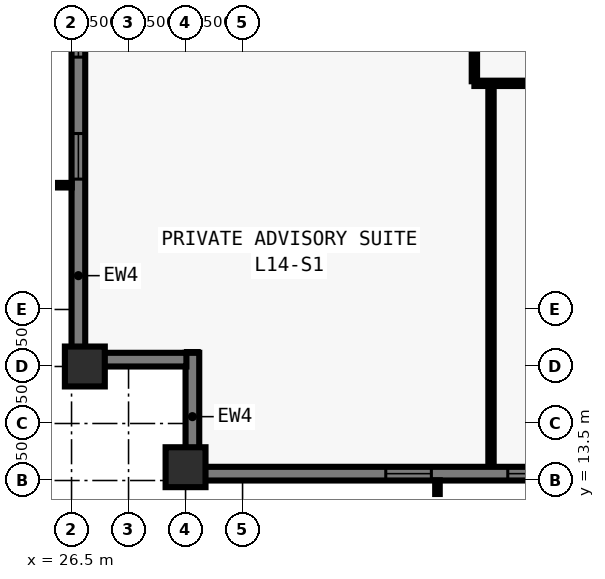
"""IFC4 building model, lengths in metres.
Left out: names, types, materials, properties, quantities, classifications, styles, units other than length and angle.
Written with IfcOpenShell. Run it as: python <this file> out.ifc"""

import sys

from ifc_helpers import new_model, si_unit, direction, frame, frame_2d, origin, origin_2d, place, context, subcontext, project, spatial, rectangle, extrude, element, fill, save


model = new_model("IFC4")
c1 = context("Model", 3, precision=1e-05, world=origin(), true_north=direction((0.0, 1.0)))
c2 = subcontext(c1, "Body", "Model", "MODEL_VIEW")
j1 = project(units=[si_unit("LENGTHUNIT", "METRE"), si_unit("PLANEANGLEUNIT", "RADIAN")], contexts=[c1])
p1 = place(None, origin())
s1 = spatial("IfcSite", under=j1, at=p1, CompositionType="ELEMENT")
p2 = place(p1, origin())
s2 = spatial("IfcBuilding", under=s1, at=p2, CompositionType="ELEMENT")
p3 = place(p2, frame((0.0, 0.0, 55.0)))
s3 = spatial("IfcBuildingStorey", under=s2, at=p3, CompositionType="ELEMENT", Elevation=55.0)
for number, where, z_axis, x_axis in (
    (1, (29.5, 13.85, 0.0), (0.0, 0.0, 1.0), (1.0, 0.0, 0.0)),
    (2, (26.85, 16.5, 0.0), (0.0, 0.0, 1.0), (0.0, 1.0, 0.0)),
):
    element("IfcColumn", number, at=place(p3, frame(where, z_axis=z_axis, x_axis=x_axis)), inside=s3, PredefinedType="COLUMN", context=c2, shape_type="SweptSolid", body=[
        extrude(rectangle(XDim=1.05, YDim=1.05, at=origin_2d()), origin(), (0.0, 0.0, 1.0), 3.5),
    ])
p4 = place(p3, frame((74.5, 13.68, 0.0), z_axis=(0.0, 0.0, 1.0), x_axis=(-1.0, 0.0, 0.0)))
e3 = element("IfcWall", 3, at=p4, inside=s3, PredefinedType="SOLIDWALL", context=c2, shape_type="SweptSolid", body=[
    extrude(rectangle(XDim=44.662, YDim=0.36, at=frame_2d((22.331, 0.0))), origin(), (0.0, 0.0, 1.0), 3.28),
])
p5 = place(p4, frame((4.93, 0.0, 0.8)))
e4 = element("IfcOpeningElement", 4, at=p5, cuts=e3, PredefinedType="OPENING", context=c2, shape_type="SweptSolid", body=[
    extrude(rectangle(XDim=1.2, YDim=1.544, at=frame_2d((0.6, 0.772))), frame((0.0, 0.19, 0.0), z_axis=(0.0, -1.0, 0.0), x_axis=(1.0, 0.0, 0.0)), (0.0, 0.0, 1.0), 0.38),
])
p6 = place(p4, frame((8.59, 0.0, 0.8)))
e5 = element("IfcOpeningElement", 5, at=p6, cuts=e3, PredefinedType="OPENING", context=c2, shape_type="SweptSolid", body=[
    extrude(rectangle(XDim=1.5, YDim=1.544, at=frame_2d((0.75, 0.772))), frame((0.0, 0.19, 0.0), z_axis=(0.0, -1.0, 0.0), x_axis=(1.0, 0.0, 0.0)), (0.0, 0.0, 1.0), 0.38),
])
p7 = place(p4, frame((11.65, 0.0, 0.8)))
e6 = element("IfcOpeningElement", 6, at=p7, cuts=e3, PredefinedType="OPENING", context=c2, shape_type="SweptSolid", body=[
    extrude(rectangle(XDim=1.2, YDim=1.544, at=frame_2d((0.6, 0.772))), frame((0.0, 0.19, 0.0), z_axis=(0.0, -1.0, 0.0), x_axis=(1.0, 0.0, 0.0)), (0.0, 0.0, 1.0), 0.38),
])
p8 = place(p4, frame((14.861, 0.0, 0.8)))
e7 = element("IfcOpeningElement", 7, at=p8, cuts=e3, PredefinedType="OPENING", context=c2, shape_type="SweptSolid", body=[
    extrude(rectangle(XDim=1.5, YDim=1.544, at=frame_2d((0.75, 0.772))), frame((0.0, 0.19, 0.0), z_axis=(0.0, -1.0, 0.0), x_axis=(1.0, 0.0, 0.0)), (0.0, 0.0, 1.0), 0.38),
])
p9 = place(p4, frame((18.821, 0.0, 0.8)))
e8 = element("IfcOpeningElement", 8, at=p9, cuts=e3, PredefinedType="OPENING", context=c2, shape_type="SweptSolid", body=[
    extrude(rectangle(XDim=1.2, YDim=1.544, at=frame_2d((0.6, 0.772))), frame((0.0, 0.19, 0.0), z_axis=(0.0, -1.0, 0.0), x_axis=(1.0, 0.0, 0.0)), (0.0, 0.0, 1.0), 0.38),
])
p10 = place(p4, frame((21.581, 0.0, 0.8)))
e9 = element("IfcOpeningElement", 9, at=p10, cuts=e3, PredefinedType="OPENING", context=c2, shape_type="SweptSolid", body=[
    extrude(rectangle(XDim=1.5, YDim=1.544, at=frame_2d((0.75, 0.772))), frame((0.0, 0.19, 0.0), z_axis=(0.0, -1.0, 0.0), x_axis=(1.0, 0.0, 0.0)), (0.0, 0.0, 1.0), 0.38),
])
p11 = place(p4, frame((25.091, 0.0, 0.8)))
e10 = element("IfcOpeningElement", 10, at=p11, cuts=e3, PredefinedType="OPENING", context=c2, shape_type="SweptSolid", body=[
    extrude(rectangle(XDim=1.2, YDim=1.544, at=frame_2d((0.6, 0.772))), frame((0.0, 0.19, 0.0), z_axis=(0.0, -1.0, 0.0), x_axis=(1.0, 0.0, 0.0)), (0.0, 0.0, 1.0), 0.38),
])
p12 = place(p4, frame((28.302, 0.0, 0.8)))
e11 = element("IfcOpeningElement", 11, at=p12, cuts=e3, PredefinedType="OPENING", context=c2, shape_type="SweptSolid", body=[
    extrude(rectangle(XDim=1.5, YDim=1.544, at=frame_2d((0.75, 0.772))), frame((0.0, 0.19, 0.0), z_axis=(0.0, -1.0, 0.0), x_axis=(1.0, 0.0, 0.0)), (0.0, 0.0, 1.0), 0.38),
])
p13 = place(p4, frame((31.812, 0.0, 0.8)))
e12 = element("IfcOpeningElement", 12, at=p13, cuts=e3, PredefinedType="OPENING", context=c2, shape_type="SweptSolid", body=[
    extrude(rectangle(XDim=1.2, YDim=1.544, at=frame_2d((0.6, 0.772))), frame((0.0, 0.19, 0.0), z_axis=(0.0, -1.0, 0.0), x_axis=(1.0, 0.0, 0.0)), (0.0, 0.0, 1.0), 0.38),
])
p14 = place(p4, frame((35.022, 0.0, 0.8)))
e13 = element("IfcOpeningElement", 13, at=p14, cuts=e3, PredefinedType="OPENING", context=c2, shape_type="SweptSolid", body=[
    extrude(rectangle(XDim=1.5, YDim=1.544, at=frame_2d((0.75, 0.772))), frame((0.0, 0.19, 0.0), z_axis=(0.0, -1.0, 0.0), x_axis=(1.0, 0.0, 0.0)), (0.0, 0.0, 1.0), 0.38),
])
p15 = place(p4, frame((38.532, 0.0, 0.8)))
e14 = element("IfcOpeningElement", 14, at=p15, cuts=e3, PredefinedType="OPENING", context=c2, shape_type="SweptSolid", body=[
    extrude(rectangle(XDim=1.2, YDim=1.544, at=frame_2d((0.6, 0.772))), frame((0.0, 0.19, 0.0), z_axis=(0.0, -1.0, 0.0), x_axis=(1.0, 0.0, 0.0)), (0.0, 0.0, 1.0), 0.38),
])
p16 = place(p3, frame((29.68, 13.5, 0.0), z_axis=(0.0, 0.0, 1.0), x_axis=(0.0, 1.0, 0.0)))
e15 = element("IfcWall", 15, at=p16, inside=s3, PredefinedType="SOLIDWALL", context=c2, shape_type="SweptSolid", body=[
    extrude(rectangle(XDim=3.36, YDim=0.36, at=frame_2d((1.68, 0.0))), origin(), (0.0, 0.0, 1.0), 3.28),
])
p17 = place(p3, frame((29.522, 16.68, 0.0), z_axis=(0.0, 0.0, 1.0), x_axis=(-1.0, 0.0, 0.0)))
e16 = element("IfcWall", 16, at=p17, inside=s3, PredefinedType="SOLIDWALL", context=c2, shape_type="SweptSolid", body=[
    extrude(rectangle(XDim=2.684, YDim=0.36, at=frame_2d((1.342, 0.0))), origin(), (0.0, 0.0, 1.0), 3.28),
])
p18 = place(p3, frame((26.68, 16.5, 0.0), z_axis=(0.0, 0.0, 1.0), x_axis=(0.0, 1.0, 0.0)))
e17 = element("IfcWall", 17, at=p18, inside=s3, PredefinedType="SOLIDWALL", context=c2, shape_type="SweptSolid", body=[
    extrude(rectangle(XDim=44.662, YDim=0.36, at=frame_2d((22.331, 0.0))), origin(), (0.0, 0.0, 1.0), 3.28),
])
p19 = place(p18, frame((4.93, 0.0, 0.8)))
e18 = element("IfcOpeningElement", 18, at=p19, cuts=e17, PredefinedType="OPENING", context=c2, shape_type="SweptSolid", body=[
    extrude(rectangle(XDim=1.2, YDim=1.544, at=frame_2d((0.6, 0.772))), frame((0.0, 0.19, 0.0), z_axis=(0.0, -1.0, 0.0), x_axis=(1.0, 0.0, 0.0)), (0.0, 0.0, 1.0), 0.38),
])
p20 = place(p18, frame((8.14, 0.0, 0.8)))
e19 = element("IfcOpeningElement", 19, at=p20, cuts=e17, PredefinedType="OPENING", context=c2, shape_type="SweptSolid", body=[
    extrude(rectangle(XDim=1.5, YDim=1.544, at=frame_2d((0.75, 0.772))), frame((0.0, 0.19, 0.0), z_axis=(0.0, -1.0, 0.0), x_axis=(1.0, 0.0, 0.0)), (0.0, 0.0, 1.0), 0.38),
])
p21 = place(p18, frame((11.65, 0.0, 0.8)))
e20 = element("IfcOpeningElement", 20, at=p21, cuts=e17, PredefinedType="OPENING", context=c2, shape_type="SweptSolid", body=[
    extrude(rectangle(XDim=1.2, YDim=1.544, at=frame_2d((0.6, 0.772))), frame((0.0, 0.19, 0.0), z_axis=(0.0, -1.0, 0.0), x_axis=(1.0, 0.0, 0.0)), (0.0, 0.0, 1.0), 0.38),
])
p22 = place(p18, frame((14.861, 0.0, 0.8)))
e21 = element("IfcOpeningElement", 21, at=p22, cuts=e17, PredefinedType="OPENING", context=c2, shape_type="SweptSolid", body=[
    extrude(rectangle(XDim=1.5, YDim=1.544, at=frame_2d((0.75, 0.772))), frame((0.0, 0.19, 0.0), z_axis=(0.0, -1.0, 0.0), x_axis=(1.0, 0.0, 0.0)), (0.0, 0.0, 1.0), 0.38),
])
p23 = place(p18, frame((19.621, 0.0, 0.8)))
e22 = element("IfcOpeningElement", 22, at=p23, cuts=e17, PredefinedType="OPENING", context=c2, shape_type="SweptSolid", body=[
    extrude(rectangle(XDim=1.2, YDim=1.544, at=frame_2d((0.6, 0.772))), frame((0.0, 0.19, 0.0), z_axis=(0.0, -1.0, 0.0), x_axis=(1.0, 0.0, 0.0)), (0.0, 0.0, 1.0), 0.38),
])
p24 = place(p18, frame((21.581, 0.0, 0.8)))
e23 = element("IfcOpeningElement", 23, at=p24, cuts=e17, PredefinedType="OPENING", context=c2, shape_type="SweptSolid", body=[
    extrude(rectangle(XDim=1.5, YDim=1.544, at=frame_2d((0.75, 0.772))), frame((0.0, 0.19, 0.0), z_axis=(0.0, -1.0, 0.0), x_axis=(1.0, 0.0, 0.0)), (0.0, 0.0, 1.0), 0.38),
])
p25 = place(p18, frame((24.241, 0.0, 0.8)))
e24 = element("IfcOpeningElement", 24, at=p25, cuts=e17, PredefinedType="OPENING", context=c2, shape_type="SweptSolid", body=[
    extrude(rectangle(XDim=1.2, YDim=1.544, at=frame_2d((0.6, 0.772))), frame((0.0, 0.19, 0.0), z_axis=(0.0, -1.0, 0.0), x_axis=(1.0, 0.0, 0.0)), (0.0, 0.0, 1.0), 0.38),
])
p26 = place(p18, frame((28.302, 0.0, 0.8)))
e25 = element("IfcOpeningElement", 25, at=p26, cuts=e17, PredefinedType="OPENING", context=c2, shape_type="SweptSolid", body=[
    extrude(rectangle(XDim=1.5, YDim=1.544, at=frame_2d((0.75, 0.772))), frame((0.0, 0.19, 0.0), z_axis=(0.0, -1.0, 0.0), x_axis=(1.0, 0.0, 0.0)), (0.0, 0.0, 1.0), 0.38),
])
p27 = place(p18, frame((31.812, 0.0, 0.8)))
e26 = element("IfcOpeningElement", 26, at=p27, cuts=e17, PredefinedType="OPENING", context=c2, shape_type="SweptSolid", body=[
    extrude(rectangle(XDim=1.2, YDim=1.544, at=frame_2d((0.6, 0.772))), frame((0.0, 0.19, 0.0), z_axis=(0.0, -1.0, 0.0), x_axis=(1.0, 0.0, 0.0)), (0.0, 0.0, 1.0), 0.38),
])
p28 = place(p18, frame((35.022, 0.0, 0.8)))
e27 = element("IfcOpeningElement", 27, at=p28, cuts=e17, PredefinedType="OPENING", context=c2, shape_type="SweptSolid", body=[
    extrude(rectangle(XDim=1.5, YDim=1.544, at=frame_2d((0.75, 0.772))), frame((0.0, 0.19, 0.0), z_axis=(0.0, -1.0, 0.0), x_axis=(1.0, 0.0, 0.0)), (0.0, 0.0, 1.0), 0.38),
])
p29 = place(p18, frame((38.532, 0.0, 0.8)))
e28 = element("IfcOpeningElement", 28, at=p29, cuts=e17, PredefinedType="OPENING", context=c2, shape_type="SweptSolid", body=[
    extrude(rectangle(XDim=1.2, YDim=1.544, at=frame_2d((0.6, 0.772))), frame((0.0, 0.19, 0.0), z_axis=(0.0, -1.0, 0.0), x_axis=(1.0, 0.0, 0.0)), (0.0, 0.0, 1.0), 0.38),
])
p30 = place(p3, frame((37.1, 23.95, 0.0), z_axis=(0.0, 0.0, 1.0), x_axis=(1.0, 0.0, 0.0)))
e29 = element("IfcWall", 29, at=p30, inside=s3, PredefinedType="PARTITIONING", context=c2, shape_type="SweptSolid", body=[
    extrude(rectangle(XDim=29.8, YDim=0.14, at=frame_2d((14.9, 0.0))), origin(), (0.0, 0.0, 1.0), 3.28),
])
p31 = place(p30, frame((4.191, 0.0, 0.0)))
e30 = element("IfcOpeningElement", 30, at=p31, cuts=e29, PredefinedType="OPENING", context=c2, shape_type="SweptSolid", body=[
    extrude(rectangle(XDim=0.96, YDim=2.12, at=frame_2d((0.48, 1.06))), frame((0.0, 0.08, 0.0), z_axis=(0.0, -1.0, 0.0), x_axis=(1.0, 0.0, 0.0)), (0.0, 0.0, 1.0), 0.16),
])
p32 = place(p30, frame((5.358, 0.0, 0.0)))
e31 = element("IfcOpeningElement", 31, at=p32, cuts=e29, PredefinedType="OPENING", context=c2, shape_type="SweptSolid", body=[
    extrude(rectangle(XDim=0.96, YDim=2.12, at=frame_2d((0.48, 1.06))), frame((0.0, 0.08, 0.0), z_axis=(0.0, -1.0, 0.0), x_axis=(1.0, 0.0, 0.0)), (0.0, 0.0, 1.0), 0.16),
])
p33 = place(p30, frame((14.51, 0.0, 0.0)))
e32 = element("IfcOpeningElement", 32, at=p33, cuts=e29, PredefinedType="OPENING", context=c2, shape_type="SweptSolid", body=[
    extrude(rectangle(XDim=0.96, YDim=2.12, at=frame_2d((0.48, 1.06))), frame((0.0, 0.08, 0.0), z_axis=(0.0, -1.0, 0.0), x_axis=(1.0, 0.0, 0.0)), (0.0, 0.0, 1.0), 0.16),
])
p34 = place(p30, frame((24.542, 0.0, 0.0)))
e33 = element("IfcOpeningElement", 33, at=p34, cuts=e29, PredefinedType="OPENING", context=c2, shape_type="SweptSolid", body=[
    extrude(rectangle(XDim=0.96, YDim=2.12, at=frame_2d((0.48, 1.06))), frame((0.0, 0.08, 0.0), z_axis=(0.0, -1.0, 0.0), x_axis=(1.0, 0.0, 0.0)), (0.0, 0.0, 1.0), 0.16),
])
p35 = place(p30, frame((28.26, 0.0, 0.0)))
e34 = element("IfcOpeningElement", 34, at=p35, cuts=e29, PredefinedType="OPENING", context=c2, shape_type="SweptSolid", body=[
    extrude(rectangle(XDim=0.96, YDim=2.12, at=frame_2d((0.48, 1.06))), frame((0.0, 0.08, 0.0), z_axis=(0.0, -1.0, 0.0), x_axis=(1.0, 0.0, 0.0)), (0.0, 0.0, 1.0), 0.16),
])
p36 = place(p3, frame((37.1, 24.005, 0.0), z_axis=(0.0, 0.0, 1.0), x_axis=(0.0, 1.0, 0.0)))
e35 = element("IfcWall", 35, at=p36, inside=s3, PredefinedType="PARTITIONING", context=c2, shape_type="SweptSolid", body=[
    extrude(rectangle(XDim=29.99, YDim=0.14, at=frame_2d((14.995, 0.0))), origin(), (0.0, 0.0, 1.0), 3.28),
])
p37 = place(p36, frame((2.76, 0.0, 0.0)))
e36 = element("IfcOpeningElement", 36, at=p37, cuts=e35, PredefinedType="OPENING", context=c2, shape_type="SweptSolid", body=[
    extrude(rectangle(XDim=0.96, YDim=2.12, at=frame_2d((0.48, 1.06))), frame((0.0, 0.08, 0.0), z_axis=(0.0, -1.0, 0.0), x_axis=(1.0, 0.0, 0.0)), (0.0, 0.0, 1.0), 0.16),
])
p38 = place(p36, frame((8.598, 0.0, 0.0)))
e37 = element("IfcOpeningElement", 37, at=p38, cuts=e35, PredefinedType="OPENING", context=c2, shape_type="SweptSolid", body=[
    extrude(rectangle(XDim=0.96, YDim=2.12, at=frame_2d((0.48, 1.06))), frame((0.0, 0.08, 0.0), z_axis=(0.0, -1.0, 0.0), x_axis=(1.0, 0.0, 0.0)), (0.0, 0.0, 1.0), 0.16),
])
p39 = place(p36, frame((14.578, 0.0, 0.0)))
e38 = element("IfcOpeningElement", 38, at=p39, cuts=e35, PredefinedType="OPENING", context=c2, shape_type="SweptSolid", body=[
    extrude(rectangle(XDim=0.96, YDim=2.12, at=frame_2d((0.48, 1.06))), frame((0.0, 0.08, 0.0), z_axis=(0.0, -1.0, 0.0), x_axis=(1.0, 0.0, 0.0)), (0.0, 0.0, 1.0), 0.16),
])
p40 = place(p36, frame((20.558, 0.0, 0.0)))
e39 = element("IfcOpeningElement", 39, at=p40, cuts=e35, PredefinedType="OPENING", context=c2, shape_type="SweptSolid", body=[
    extrude(rectangle(XDim=0.96, YDim=2.12, at=frame_2d((0.48, 1.06))), frame((0.0, 0.08, 0.0), z_axis=(0.0, -1.0, 0.0), x_axis=(1.0, 0.0, 0.0)), (0.0, 0.0, 1.0), 0.16),
])
p41 = place(p36, frame((26.333, 0.0, 0.0)))
e40 = element("IfcOpeningElement", 40, at=p41, cuts=e35, PredefinedType="OPENING", context=c2, shape_type="SweptSolid", body=[
    extrude(rectangle(XDim=0.96, YDim=2.12, at=frame_2d((0.48, 1.06))), frame((0.0, 0.08, 0.0), z_axis=(0.0, -1.0, 0.0), x_axis=(1.0, 0.0, 0.0)), (0.0, 0.0, 1.0), 0.16),
])
p42 = place(p3, frame((37.537, 13.92, 0.0), z_axis=(0.0, 0.0, 1.0), x_axis=(0.0, 1.0, 0.0)))
e41 = element("IfcWall", 41, at=p42, inside=s3, PredefinedType="PARTITIONING", context=c2, shape_type="SweptSolid", body=[
    extrude(rectangle(XDim=9.93, YDim=0.14, at=frame_2d((4.965, 0.0))), origin(), (0.0, 0.0, 1.0), 2.439),
])
p43 = place(p14, origin())
e42 = element("IfcWindow", 42, at=p43, inside=s3, PartitioningType="SINGLE_PANEL", PredefinedType="WINDOW", context=c2, shape_type="SweptSolid", body=[
    extrude(rectangle(XDim=1.5, YDim=1.544, at=frame_2d((0.75, 0.772))), frame((0.0, -0.05, 0.0), z_axis=(0.0, -1.0, 0.0), x_axis=(1.0, 0.0, 0.0)), (0.0, 0.0, 1.0), 0.06),
])
fill(e13, e42)
p44 = place(p15, origin())
e43 = element("IfcWindow", 43, at=p44, inside=s3, PartitioningType="SINGLE_PANEL", PredefinedType="WINDOW", context=c2, shape_type="SweptSolid", body=[
    extrude(rectangle(XDim=1.2, YDim=1.544, at=frame_2d((0.6, 0.772))), frame((0.0, -0.05, 0.0), z_axis=(0.0, -1.0, 0.0), x_axis=(1.0, 0.0, 0.0)), (0.0, 0.0, 1.0), 0.06),
])
fill(e14, e43)
p45 = place(p19, origin())
e44 = element("IfcWindow", 44, at=p45, inside=s3, PartitioningType="SINGLE_PANEL", PredefinedType="WINDOW", context=c2, shape_type="SweptSolid", body=[
    extrude(rectangle(XDim=1.2, YDim=1.544, at=frame_2d((0.6, 0.772))), frame((0.0, -0.05, 0.0), z_axis=(0.0, -1.0, 0.0), x_axis=(1.0, 0.0, 0.0)), (0.0, 0.0, 1.0), 0.06),
])
fill(e18, e44)
p46 = place(p20, origin())
e45 = element("IfcWindow", 45, at=p46, inside=s3, PartitioningType="SINGLE_PANEL", PredefinedType="WINDOW", context=c2, shape_type="SweptSolid", body=[
    extrude(rectangle(XDim=1.5, YDim=1.544, at=frame_2d((0.75, 0.772))), frame((0.0, -0.05, 0.0), z_axis=(0.0, -1.0, 0.0), x_axis=(1.0, 0.0, 0.0)), (0.0, 0.0, 1.0), 0.06),
])
fill(e19, e45)
save(model, sys.argv[1])
